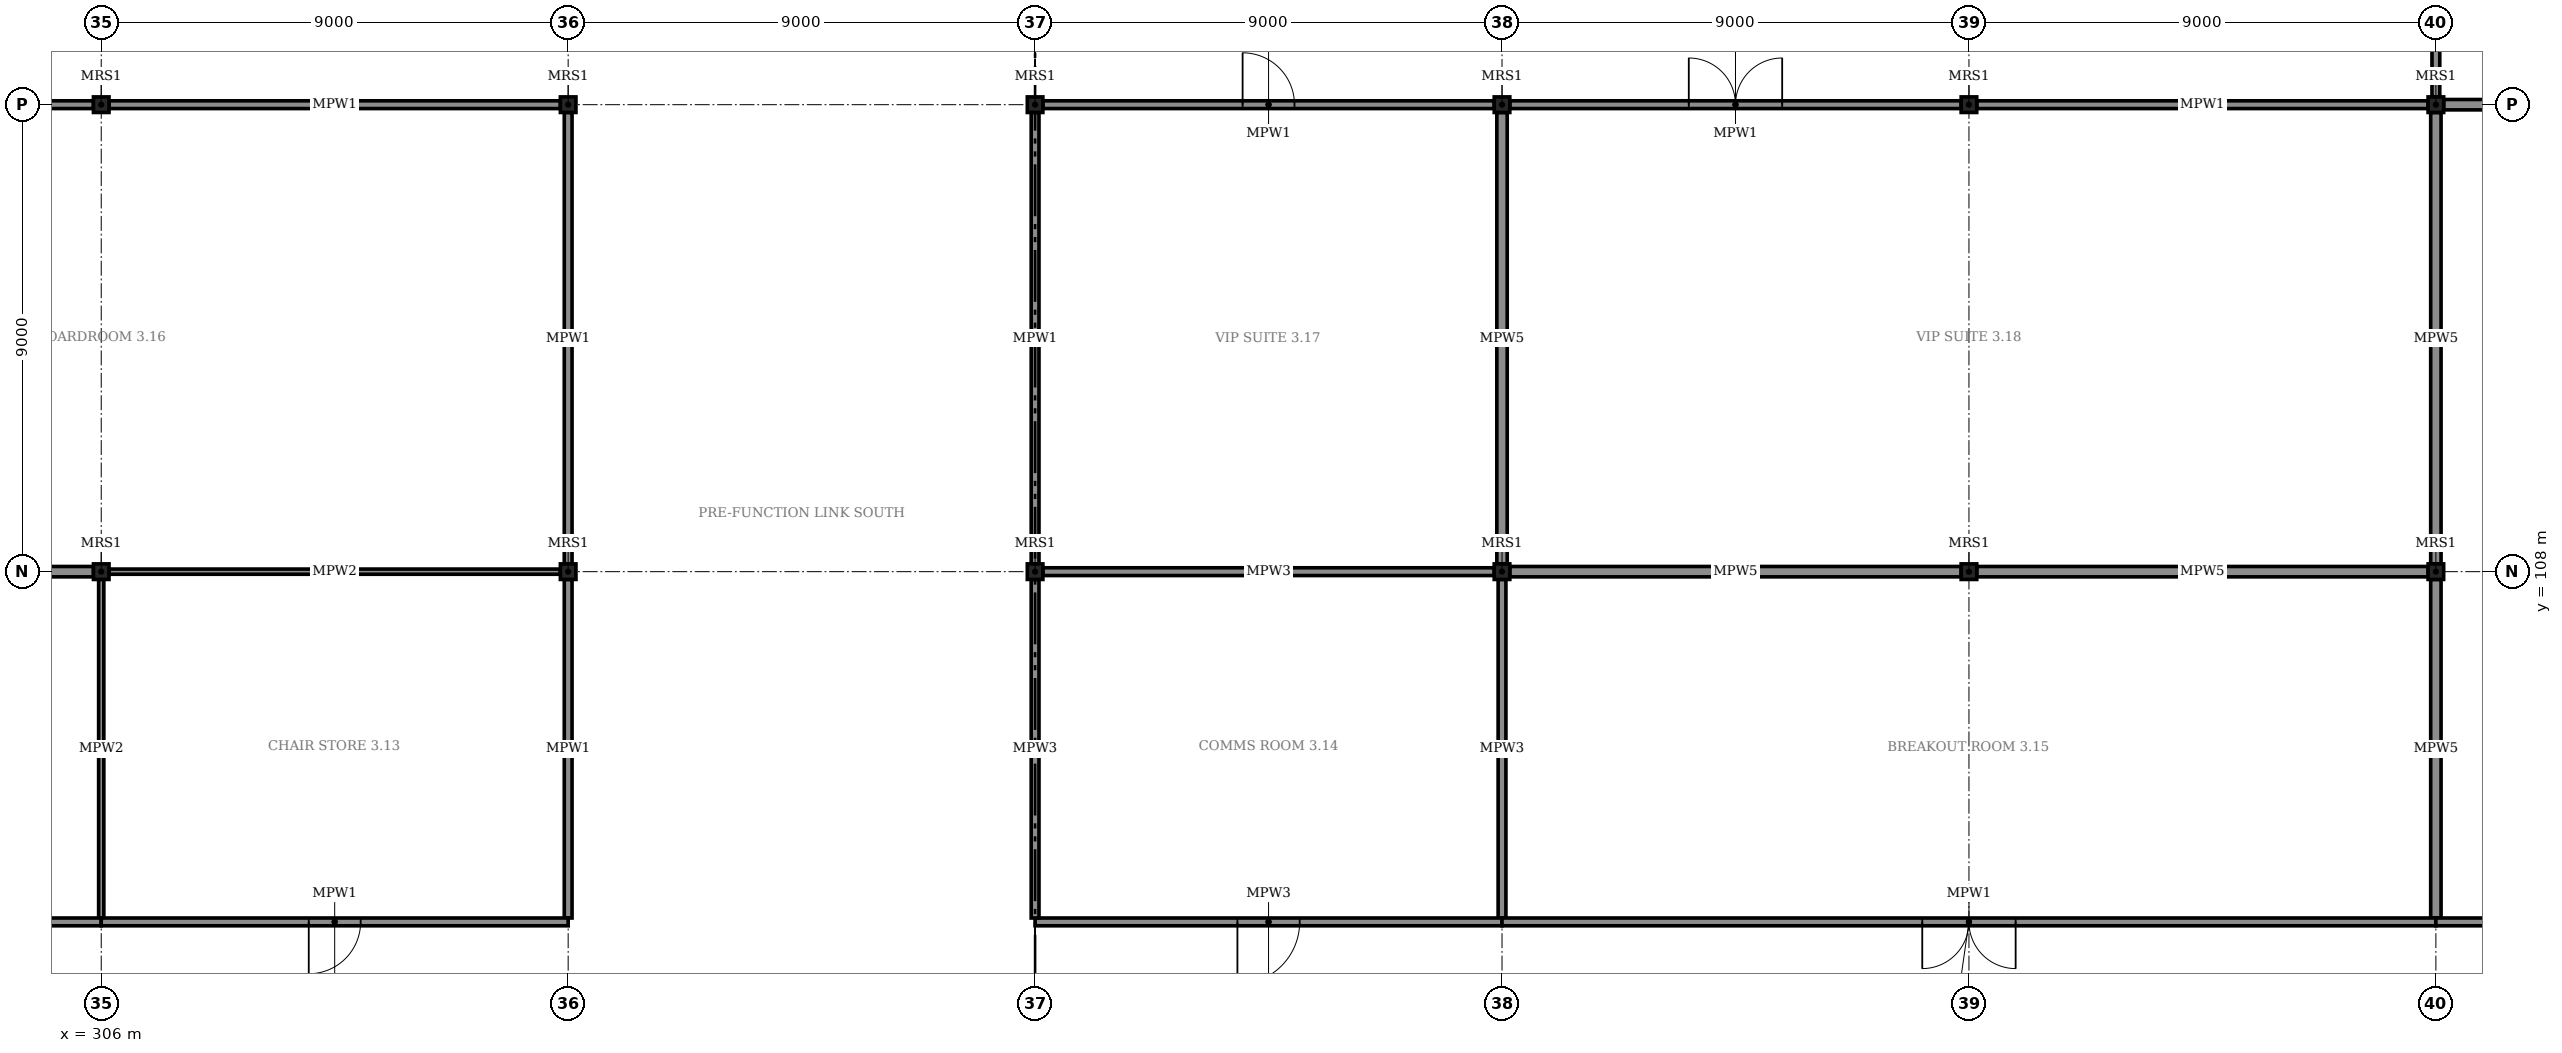
"""IFC4 building model, lengths in metres.
Left out: names, types, materials, properties, quantities, classifications, styles, units other than length and angle.
Written with IfcOpenShell. Run it as: python <this file> out.ifc"""

import sys

from ifc_helpers import new_model, si_unit, direction, frame, frame_2d, origin, origin_2d, place, context, subcontext, project, spatial, rectangle, hollow_rectangle, extrude, element, fill, save


model = new_model("IFC4")
c1 = context("Model", 3, precision=1e-05, world=origin(), true_north=direction((0.0, 1.0)))
c2 = subcontext(c1, "Body", "Model", "MODEL_VIEW")
j1 = project(units=[si_unit("LENGTHUNIT", "METRE"), si_unit("PLANEANGLEUNIT", "RADIAN")], contexts=[c1])
p1 = place(None, origin())
s1 = spatial("IfcSite", under=j1, at=p1, CompositionType="ELEMENT")
p2 = place(p1, origin())
s2 = spatial("IfcBuilding", under=s1, at=p2, CompositionType="ELEMENT")
p3 = place(p2, frame((0.0, 0.0, 17.0)))
s3 = spatial("IfcBuildingStorey", under=s2, at=p3, CompositionType="ELEMENT", Elevation=17.0)
for number, where, z_axis, x_axis in (
    (1, (306.0, 108.0, 0.0), (0.0, 0.0, 1.0), (1.0, 0.0, 0.0)),
    (2, (306.0, 117.0, 0.0), (0.0, 0.0, 1.0), (1.0, 0.0, 0.0)),
    (3, (315.0, 108.0, 0.0), (0.0, 0.0, 1.0), (1.0, 0.0, 0.0)),
    (4, (315.0, 117.0, 0.0), (0.0, 0.0, 1.0), (1.0, 0.0, 0.0)),
    (5, (324.0, 108.0, 0.0), (0.0, 0.0, 1.0), (1.0, 0.0, 0.0)),
    (6, (324.0, 117.0, 0.0), (0.0, 0.0, 1.0), (1.0, 0.0, 0.0)),
    (7, (333.0, 108.0, 0.0), (0.0, 0.0, 1.0), (1.0, 0.0, 0.0)),
    (8, (333.0, 117.0, 0.0), (0.0, 0.0, 1.0), (1.0, 0.0, 0.0)),
    (9, (342.0, 108.0, 0.0), (0.0, 0.0, 1.0), (1.0, 0.0, 0.0)),
    (10, (342.0, 117.0, 0.0), (0.0, 0.0, 1.0), (1.0, 0.0, 0.0)),
    (11, (351.0, 108.0, 0.0), (0.0, 0.0, 1.0), (1.0, 0.0, 0.0)),
    (12, (351.0, 117.0, 0.0), (0.0, 0.0, 1.0), (1.0, 0.0, 0.0)),
):
    element("IfcColumn", number, at=place(p3, frame(where, z_axis=z_axis, x_axis=x_axis)), inside=s3, PredefinedType="COLUMN", context=c2, shape_type="SweptSolid", body=[
        extrude(hollow_rectangle(XDim=0.3, YDim=0.3, WallThickness=0.012, InnerFilletRadius=0.024, OuterFilletRadius=0.036, at=origin_2d()), origin(), (0.0, 0.0, 1.0), 3.1),
    ])
p4 = place(p3, frame((297.0, 101.25, 0.0), z_axis=(0.0, 0.0, 1.0), x_axis=(1.0, 0.0, 0.0)))
e13 = element("IfcWall", 13, at=p4, inside=s3, PredefinedType="PARTITIONING", context=c2, shape_type="SweptSolid", body=[
    extrude(rectangle(XDim=9.0, YDim=0.15, at=frame_2d((4.5, 0.0))), origin(), (0.0, 0.0, 1.0), 3.0),
])
p5 = place(p4, frame((4.0, 0.0, 0.0)))
e14 = element("IfcOpeningElement", 14, at=p5, cuts=e13, PredefinedType="OPENING", context=c2, shape_type="SweptSolid", body=[
    extrude(rectangle(XDim=1.0, YDim=2.4, at=frame_2d((0.5, 1.2))), frame((0.0, 0.085, 0.0), z_axis=(0.0, -1.0, 0.0), x_axis=(1.0, 0.0, 0.0)), (0.0, 0.0, 1.0), 0.17),
])
p6 = place(p3, frame((297.15, 108.0, 0.0), z_axis=(0.0, 0.0, 1.0), x_axis=(1.0, 0.0, 0.0)))
e15 = element("IfcWall", 15, at=p6, inside=s3, PredefinedType="PARTITIONING", context=c2, shape_type="SweptSolid", body=[
    extrude(rectangle(XDim=8.7, YDim=0.2, at=frame_2d((4.35, 0.0))), origin(), (0.0, 0.0, 1.0), 3.0),
])
p7 = place(p3, frame((306.0, 101.325, 0.0), z_axis=(0.0, 0.0, 1.0), x_axis=(0.0, 1.0, 0.0)))
e16 = element("IfcWall", 16, at=p7, inside=s3, PredefinedType="PARTITIONING", context=c2, shape_type="SweptSolid", body=[
    extrude(rectangle(XDim=6.525, YDim=0.1, at=frame_2d((3.263, 0.0))), origin(), (0.0, 0.0, 1.0), 3.0),
])
p8 = place(p3, frame((306.0, 101.25, 0.0), z_axis=(0.0, 0.0, 1.0), x_axis=(1.0, 0.0, 0.0)))
e17 = element("IfcWall", 17, at=p8, inside=s3, PredefinedType="PARTITIONING", context=c2, shape_type="SweptSolid", body=[
    extrude(rectangle(XDim=9.0, YDim=0.15, at=frame_2d((4.5, 0.0))), origin(), (0.0, 0.0, 1.0), 3.0),
])
p9 = place(p8, frame((4.0, 0.0, 0.0)))
e18 = element("IfcOpeningElement", 18, at=p9, cuts=e17, PredefinedType="OPENING", context=c2, shape_type="SweptSolid", body=[
    extrude(rectangle(XDim=1.0, YDim=2.4, at=frame_2d((0.5, 1.2))), frame((0.0, 0.085, 0.0), z_axis=(0.0, -1.0, 0.0), x_axis=(1.0, 0.0, 0.0)), (0.0, 0.0, 1.0), 0.17),
])
p10 = place(p3, frame((306.15, 108.0, 0.0), z_axis=(0.0, 0.0, 1.0), x_axis=(1.0, 0.0, 0.0)))
e19 = element("IfcWall", 19, at=p10, inside=s3, PredefinedType="PARTITIONING", context=c2, shape_type="SweptSolid", body=[
    extrude(rectangle(XDim=8.7, YDim=0.1, at=frame_2d((4.35, 0.0))), origin(), (0.0, 0.0, 1.0), 3.0),
])
p11 = place(p3, frame((315.0, 101.325, 0.0), z_axis=(0.0, 0.0, 1.0), x_axis=(0.0, 1.0, 0.0)))
e20 = element("IfcWall", 20, at=p11, inside=s3, PredefinedType="PARTITIONING", context=c2, shape_type="SweptSolid", body=[
    extrude(rectangle(XDim=6.525, YDim=0.15, at=frame_2d((3.263, 0.0))), origin(), (0.0, 0.0, 1.0), 3.0),
])
p12 = place(p3, frame((324.0, 101.25, 0.0), z_axis=(0.0, 0.0, 1.0), x_axis=(1.0, 0.0, 0.0)))
e21 = element("IfcWall", 21, at=p12, inside=s3, PredefinedType="PARTITIONING", context=c2, shape_type="SweptSolid", body=[
    extrude(rectangle(XDim=9.0, YDim=0.15, at=frame_2d((4.5, 0.0))), origin(), (0.0, 0.0, 1.0), 3.0),
])
p13 = place(p12, frame((3.9, 0.0, 0.0)))
e22 = element("IfcOpeningElement", 22, at=p13, cuts=e21, PredefinedType="OPENING", context=c2, shape_type="SweptSolid", body=[
    extrude(rectangle(XDim=1.2, YDim=2.4, at=frame_2d((0.6, 1.2))), frame((0.0, 0.085, 0.0), z_axis=(0.0, -1.0, 0.0), x_axis=(1.0, 0.0, 0.0)), (0.0, 0.0, 1.0), 0.17),
])
p14 = place(p3, frame((324.15, 108.0, 0.0), z_axis=(0.0, 0.0, 1.0), x_axis=(1.0, 0.0, 0.0)))
e23 = element("IfcWall", 23, at=p14, inside=s3, PredefinedType="PARTITIONING", context=c2, shape_type="SweptSolid", body=[
    extrude(rectangle(XDim=8.7, YDim=0.15, at=frame_2d((4.35, 0.0))), origin(), (0.0, 0.0, 1.0), 3.0),
])
for number, where, z_axis, x_axis in (
    (24, (324.0, 101.325, 0.0), (0.0, 0.0, 1.0), (0.0, 1.0, 0.0)),
    (25, (333.0, 101.325, 0.0), (0.0, 0.0, 1.0), (0.0, 1.0, 0.0)),
):
    element("IfcWall", number, at=place(p3, frame(where, z_axis=z_axis, x_axis=x_axis)), inside=s3, PredefinedType="PARTITIONING", context=c2, shape_type="SweptSolid", body=[
        extrude(rectangle(XDim=6.525, YDim=0.15, at=frame_2d((3.263, 0.0))), origin(), (0.0, 0.0, 1.0), 3.0),
    ])
p15 = place(p3, frame((333.0, 101.25, 0.0), z_axis=(0.0, 0.0, 1.0), x_axis=(1.0, 0.0, 0.0)))
e26 = element("IfcWall", 26, at=p15, inside=s3, PredefinedType="PARTITIONING", context=c2, shape_type="SweptSolid", body=[
    extrude(rectangle(XDim=18.0, YDim=0.15, at=frame_2d((9.0, 0.0))), origin(), (0.0, 0.0, 1.0), 3.0),
])
p16 = place(p15, frame((8.1, 0.0, 0.0)))
e27 = element("IfcOpeningElement", 27, at=p16, cuts=e26, PredefinedType="OPENING", context=c2, shape_type="SweptSolid", body=[
    extrude(rectangle(XDim=1.8, YDim=2.4, at=frame_2d((0.9, 1.2))), frame((0.0, 0.085, 0.0), z_axis=(0.0, -1.0, 0.0), x_axis=(1.0, 0.0, 0.0)), (0.0, 0.0, 1.0), 0.17),
])
for number, where, z_axis, x_axis in (
    (28, (333.15, 108.0, 0.0), (0.0, 0.0, 1.0), (1.0, 0.0, 0.0)),
    (29, (342.15, 108.0, 0.0), (0.0, 0.0, 1.0), (1.0, 0.0, 0.0)),
):
    element("IfcWall", number, at=place(p3, frame(where, z_axis=z_axis, x_axis=x_axis)), inside=s3, PredefinedType="PARTITIONING", context=c2, shape_type="SweptSolid", body=[
        extrude(rectangle(XDim=8.7, YDim=0.2, at=frame_2d((4.35, 0.0))), origin(), (0.0, 0.0, 1.0), 3.0),
    ])
p17 = place(p3, frame((351.0, 101.325, 0.0), z_axis=(0.0, 0.0, 1.0), x_axis=(0.0, 1.0, 0.0)))
e30 = element("IfcWall", 30, at=p17, inside=s3, PredefinedType="PARTITIONING", context=c2, shape_type="SweptSolid", body=[
    extrude(rectangle(XDim=6.525, YDim=0.2, at=frame_2d((3.263, 0.0))), origin(), (0.0, 0.0, 1.0), 3.0),
])
p18 = place(p3, frame((297.15, 117.0, 0.0), z_axis=(0.0, 0.0, 1.0), x_axis=(1.0, 0.0, 0.0)))
e31 = element("IfcWall", 31, at=p18, inside=s3, PredefinedType="PARTITIONING", context=c2, shape_type="SweptSolid", body=[
    extrude(rectangle(XDim=8.7, YDim=0.15, at=frame_2d((4.35, 0.0))), origin(), (0.0, 0.0, 1.0), 3.0),
])
p19 = place(p18, frame((3.45, 0.0, 0.0)))
e32 = element("IfcOpeningElement", 32, at=p19, cuts=e31, PredefinedType="OPENING", context=c2, shape_type="SweptSolid", body=[
    extrude(rectangle(XDim=1.8, YDim=2.4, at=frame_2d((0.9, 1.2))), frame((0.0, 0.085, 0.0), z_axis=(0.0, -1.0, 0.0), x_axis=(1.0, 0.0, 0.0)), (0.0, 0.0, 1.0), 0.17),
])
for number, where, z_axis, x_axis in (
    (33, (306.15, 117.0, 0.0), (0.0, 0.0, 1.0), (1.0, 0.0, 0.0)),
    (34, (315.0, 108.15, 0.0), (0.0, 0.0, 1.0), (0.0, 1.0, 0.0)),
):
    element("IfcWall", number, at=place(p3, frame(where, z_axis=z_axis, x_axis=x_axis)), inside=s3, PredefinedType="PARTITIONING", context=c2, shape_type="SweptSolid", body=[
        extrude(rectangle(XDim=8.7, YDim=0.15, at=frame_2d((4.35, 0.0))), origin(), (0.0, 0.0, 1.0), 3.0),
    ])
p20 = place(p3, frame((324.15, 117.0, 0.0), z_axis=(0.0, 0.0, 1.0), x_axis=(1.0, 0.0, 0.0)))
e35 = element("IfcWall", 35, at=p20, inside=s3, PredefinedType="PARTITIONING", context=c2, shape_type="SweptSolid", body=[
    extrude(rectangle(XDim=8.7, YDim=0.15, at=frame_2d((4.35, 0.0))), origin(), (0.0, 0.0, 1.0), 3.0),
])
p21 = place(p20, frame((3.85, 0.0, 0.0)))
e36 = element("IfcOpeningElement", 36, at=p21, cuts=e35, PredefinedType="OPENING", context=c2, shape_type="SweptSolid", body=[
    extrude(rectangle(XDim=1.0, YDim=2.4, at=frame_2d((0.5, 1.2))), frame((0.0, 0.085, 0.0), z_axis=(0.0, -1.0, 0.0), x_axis=(1.0, 0.0, 0.0)), (0.0, 0.0, 1.0), 0.17),
])
p22 = place(p3, frame((324.0, 108.15, 0.0), z_axis=(0.0, 0.0, 1.0), x_axis=(0.0, 1.0, 0.0)))
e37 = element("IfcWall", 37, at=p22, inside=s3, PredefinedType="PARTITIONING", context=c2, shape_type="SweptSolid", body=[
    extrude(rectangle(XDim=8.7, YDim=0.15, at=frame_2d((4.35, 0.0))), origin(), (0.0, 0.0, 1.0), 3.0),
])
p23 = place(p3, frame((333.0, 108.15, 0.0), z_axis=(0.0, 0.0, 1.0), x_axis=(0.0, 1.0, 0.0)))
e38 = element("IfcWall", 38, at=p23, inside=s3, PredefinedType="PARTITIONING", context=c2, shape_type="SweptSolid", body=[
    extrude(rectangle(XDim=8.7, YDim=0.2, at=frame_2d((4.35, 0.0))), origin(), (0.0, 0.0, 1.0), 3.0),
])
p24 = place(p3, frame((333.15, 117.0, 0.0), z_axis=(0.0, 0.0, 1.0), x_axis=(1.0, 0.0, 0.0)))
e39 = element("IfcWall", 39, at=p24, inside=s3, PredefinedType="PARTITIONING", context=c2, shape_type="SweptSolid", body=[
    extrude(rectangle(XDim=8.7, YDim=0.15, at=frame_2d((4.35, 0.0))), origin(), (0.0, 0.0, 1.0), 3.0),
])
p25 = place(p24, frame((3.45, 0.0, 0.0)))
e40 = element("IfcOpeningElement", 40, at=p25, cuts=e39, PredefinedType="OPENING", context=c2, shape_type="SweptSolid", body=[
    extrude(rectangle(XDim=1.8, YDim=2.4, at=frame_2d((0.9, 1.2))), frame((0.0, 0.085, 0.0), z_axis=(0.0, -1.0, 0.0), x_axis=(1.0, 0.0, 0.0)), (0.0, 0.0, 1.0), 0.17),
])
p26 = place(p3, frame((342.15, 117.0, 0.0), z_axis=(0.0, 0.0, 1.0), x_axis=(1.0, 0.0, 0.0)))
e41 = element("IfcWall", 41, at=p26, inside=s3, PredefinedType="PARTITIONING", context=c2, shape_type="SweptSolid", body=[
    extrude(rectangle(XDim=8.7, YDim=0.15, at=frame_2d((4.35, 0.0))), origin(), (0.0, 0.0, 1.0), 3.0),
])
for number, where, z_axis, x_axis in (
    (42, (351.0, 108.15, 0.0), (0.0, 0.0, 1.0), (0.0, 1.0, 0.0)),
    (43, (351.15, 117.0, 0.0), (0.0, 0.0, 1.0), (1.0, 0.0, 0.0)),
):
    element("IfcWall", number, at=place(p3, frame(where, z_axis=z_axis, x_axis=x_axis)), inside=s3, PredefinedType="PARTITIONING", context=c2, shape_type="SweptSolid", body=[
        extrude(rectangle(XDim=8.7, YDim=0.2, at=frame_2d((4.35, 0.0))), origin(), (0.0, 0.0, 1.0), 3.0),
    ])
p27 = place(p3, frame((351.0, 117.15, 0.0), z_axis=(0.0, 0.0, 1.0), x_axis=(0.0, 1.0, 0.0)))
e44 = element("IfcWall", 44, at=p27, inside=s3, PredefinedType="PARTITIONING", context=c2, shape_type="SweptSolid", body=[
    extrude(rectangle(XDim=8.7, YDim=0.15, at=frame_2d((4.35, 0.0))), origin(), (0.0, 0.0, 1.0), 3.0),
])
p28 = place(p27, frame((3.85, 0.0, 0.0)))
e45 = element("IfcOpeningElement", 45, at=p28, cuts=e44, PredefinedType="OPENING", context=c2, shape_type="SweptSolid", body=[
    extrude(rectangle(XDim=1.0, YDim=2.4, at=frame_2d((0.5, 1.2))), frame((0.0, 0.085, 0.0), z_axis=(0.0, -1.0, 0.0), x_axis=(1.0, 0.0, 0.0)), (0.0, 0.0, 1.0), 0.17),
])
p29 = place(p3, frame((351.0, 101.25, 0.0), z_axis=(0.0, 0.0, 1.0), x_axis=(1.0, 0.0, 0.0)))
e46 = element("IfcWall", 46, at=p29, inside=s3, PredefinedType="PARTITIONING", context=c2, shape_type="SweptSolid", body=[
    extrude(rectangle(XDim=8.8, YDim=0.15, at=frame_2d((4.4, 0.0))), origin(), (0.0, 0.0, 1.0), 3.0),
])
p30 = place(p29, frame((3.5, 0.0, 0.0)))
e47 = element("IfcOpeningElement", 47, at=p30, cuts=e46, PredefinedType="OPENING", context=c2, shape_type="SweptSolid", body=[
    extrude(rectangle(XDim=1.8, YDim=2.4, at=frame_2d((0.9, 1.2))), frame((0.0, 0.085, 0.0), z_axis=(0.0, -1.0, 0.0), x_axis=(1.0, 0.0, 0.0)), (0.0, 0.0, 1.0), 0.17),
])
p31 = place(p9, frame((1.0, 0.0, 0.0), z_axis=(0.0, 0.0, 1.0), x_axis=(-1.0, 0.0, 0.0)))
e48 = element("IfcDoor", 48, at=p31, inside=s3, OperationType="SINGLE_SWING_LEFT", PredefinedType="DOOR", context=c2, shape_type="SweptSolid", body=[
    extrude(rectangle(XDim=1.0, YDim=2.4, at=frame_2d((0.5, 1.2))), frame((0.0, 0.025, 0.0), z_axis=(0.0, -1.0, 0.0), x_axis=(1.0, 0.0, 0.0)), (0.0, 0.0, 1.0), 0.05),
])
fill(e18, e48)
p32 = place(p13, frame((1.2, 0.0, 0.0), z_axis=(0.0, 0.0, 1.0), x_axis=(-1.0, 0.0, 0.0)))
e49 = element("IfcDoor", 49, at=p32, inside=s3, OperationType="SINGLE_SWING_LEFT", PredefinedType="DOOR", context=c2, shape_type="SweptSolid", body=[
    extrude(rectangle(XDim=1.2, YDim=2.4, at=frame_2d((0.6, 1.2))), frame((0.0, 0.025, 0.0), z_axis=(0.0, -1.0, 0.0), x_axis=(1.0, 0.0, 0.0)), (0.0, 0.0, 1.0), 0.05),
])
fill(e22, e49)
p33 = place(p16, frame((1.8, 0.0, 0.0), z_axis=(0.0, 0.0, 1.0), x_axis=(-1.0, 0.0, 0.0)))
e50 = element("IfcDoor", 50, at=p33, inside=s3, OperationType="DOUBLE_DOOR_SINGLE_SWING", PredefinedType="DOOR", context=c2, shape_type="SweptSolid", body=[
    extrude(rectangle(XDim=1.8, YDim=2.4, at=frame_2d((0.9, 1.2))), frame((0.0, 0.025, 0.0), z_axis=(0.0, -1.0, 0.0), x_axis=(1.0, 0.0, 0.0)), (0.0, 0.0, 1.0), 0.05),
])
fill(e27, e50)
p34 = place(p21, origin())
e51 = element("IfcDoor", 51, at=p34, inside=s3, OperationType="SINGLE_SWING_LEFT", PredefinedType="DOOR", context=c2, shape_type="SweptSolid", body=[
    extrude(rectangle(XDim=1.0, YDim=2.4, at=frame_2d((0.5, 1.2))), frame((0.0, 0.025, 0.0), z_axis=(0.0, -1.0, 0.0), x_axis=(1.0, 0.0, 0.0)), (0.0, 0.0, 1.0), 0.05),
])
fill(e36, e51)
p35 = place(p25, origin())
e52 = element("IfcDoor", 52, at=p35, inside=s3, OperationType="DOUBLE_DOOR_SINGLE_SWING", PredefinedType="DOOR", context=c2, shape_type="SweptSolid", body=[
    extrude(rectangle(XDim=1.8, YDim=2.4, at=frame_2d((0.9, 1.2))), frame((0.0, 0.025, 0.0), z_axis=(0.0, -1.0, 0.0), x_axis=(1.0, 0.0, 0.0)), (0.0, 0.0, 1.0), 0.05),
])
fill(e40, e52)
save(model, sys.argv[1])
